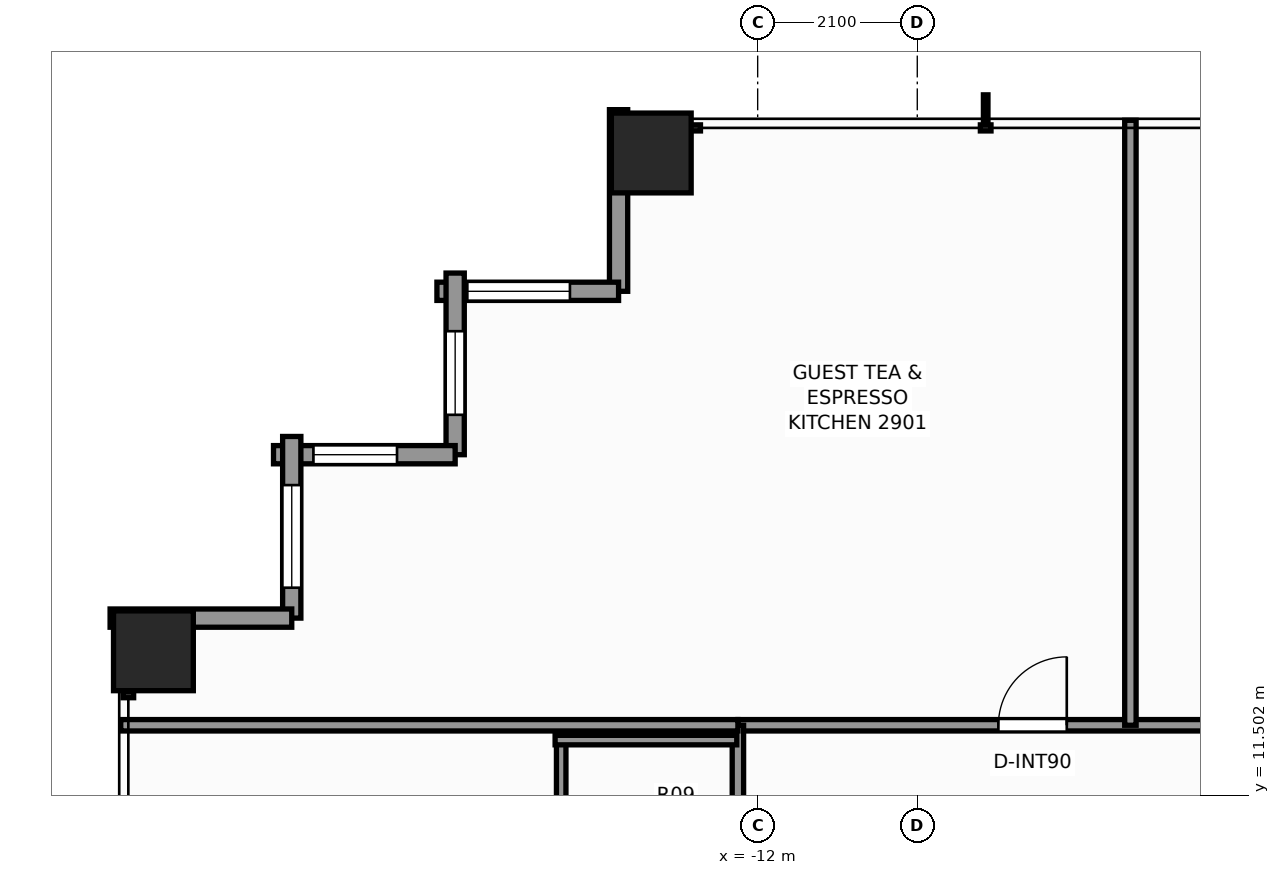
"""IFC4 building model, lengths in metres.
Left out: names, types, materials, properties, quantities, classifications, styles, units other than length and angle.
Written with IfcOpenShell. Run it as: python <this file> out.ifc"""

import sys

from ifc_helpers import new_model, si_unit, direction, frame, frame_2d, origin, origin_2d, place, context, subcontext, project, spatial, rectangle, extrude, element, fill, save


model = new_model("IFC4")
c1 = context("Model", 3, precision=1e-05, world=origin(), true_north=direction((0.0, 1.0)))
c2 = subcontext(c1, "Body", "Model", "MODEL_VIEW")
j1 = project(units=[si_unit("LENGTHUNIT", "METRE"), si_unit("PLANEANGLEUNIT", "RADIAN")], contexts=[c1])
p1 = place(None, origin())
s1 = spatial("IfcSite", under=j1, at=p1, CompositionType="ELEMENT")
p2 = place(p1, origin())
s2 = spatial("IfcBuilding", under=s1, at=p2, CompositionType="ELEMENT")
p3 = place(p2, frame((0.0, 0.0, 101.9)))
s3 = spatial("IfcBuildingStorey", under=s2, at=p3, CompositionType="ELEMENT", Elevation=101.9)
for number, where, z_axis, x_axis in (
    (1, (-13.4, 19.95, 0.0), (0.0, 0.0, 1.0), (1.0, 0.0, 0.0)),
    (2, (-19.95, 13.4, 0.0), (0.0, 0.0, 1.0), (1.0, 0.0, 0.0)),
):
    element("IfcColumn", number, at=place(p3, frame(where, z_axis=z_axis, x_axis=x_axis)), inside=s3, PredefinedType="COLUMN", context=c2, shape_type="SweptSolid", body=[
        extrude(rectangle(XDim=1.05, YDim=1.05, at=origin_2d()), origin(), (0.0, 0.0, 1.0), 3.3),
    ])
p4 = place(p3, frame((-13.83, 18.13, 0.0), z_axis=(0.0, 0.0, 1.0), x_axis=(0.0, 1.0, 0.0)))
e3 = element("IfcWall", 3, at=p4, inside=s3, PredefinedType="STANDARD", context=c2, shape_type="SweptSolid", body=[
    extrude(rectangle(XDim=2.39, YDim=0.24, at=frame_2d((1.195, 0.0))), origin(), (0.0, 0.0, 1.0), 2.459),
])
p5 = place(p3, frame((-16.22, 18.13, 0.0), z_axis=(0.0, 0.0, 1.0), x_axis=(1.0, 0.0, 0.0)))
e4 = element("IfcWall", 4, at=p5, inside=s3, PredefinedType="STANDARD", context=c2, shape_type="SweptSolid", body=[
    extrude(rectangle(XDim=2.39, YDim=0.24, at=frame_2d((1.195, 0.0))), origin(), (0.0, 0.0, 1.0), 2.459),
])
p6 = place(p5, frame((0.4, 0.0, 0.65)))
e5 = element("IfcOpeningElement", 5, at=p6, cuts=e4, PredefinedType="OPENING", context=c2, shape_type="SweptSolid", body=[
    extrude(rectangle(XDim=1.35, YDim=1.55, at=frame_2d((0.675, 0.775))), frame((0.0, 0.13, 0.0), z_axis=(0.0, -1.0, 0.0), x_axis=(1.0, 0.0, 0.0)), (0.0, 0.0, 1.0), 0.26),
])
p7 = place(p3, frame((-15.98, 15.98, 0.0), z_axis=(0.0, 0.0, 1.0), x_axis=(0.0, 1.0, 0.0)))
e6 = element("IfcWall", 6, at=p7, inside=s3, PredefinedType="STANDARD", context=c2, shape_type="SweptSolid", body=[
    extrude(rectangle(XDim=2.39, YDim=0.24, at=frame_2d((1.195, 0.0))), origin(), (0.0, 0.0, 1.0), 2.459),
])
p8 = place(p7, frame((0.525, 0.0, 0.65)))
e7 = element("IfcOpeningElement", 7, at=p8, cuts=e6, PredefinedType="OPENING", context=c2, shape_type="SweptSolid", body=[
    extrude(rectangle(XDim=1.1, YDim=1.45, at=frame_2d((0.55, 0.725))), frame((0.0, 0.13, 0.0), z_axis=(0.0, -1.0, 0.0), x_axis=(1.0, 0.0, 0.0)), (0.0, 0.0, 1.0), 0.26),
])
p9 = place(p3, frame((-18.37, 15.98, 0.0), z_axis=(0.0, 0.0, 1.0), x_axis=(1.0, 0.0, 0.0)))
e8 = element("IfcWall", 8, at=p9, inside=s3, PredefinedType="STANDARD", context=c2, shape_type="SweptSolid", body=[
    extrude(rectangle(XDim=2.39, YDim=0.24, at=frame_2d((1.195, 0.0))), origin(), (0.0, 0.0, 1.0), 2.459),
])
p10 = place(p9, frame((0.525, 0.0, 0.65)))
e9 = element("IfcOpeningElement", 9, at=p10, cuts=e8, PredefinedType="OPENING", context=c2, shape_type="SweptSolid", body=[
    extrude(rectangle(XDim=1.1, YDim=1.45, at=frame_2d((0.55, 0.725))), frame((0.0, 0.13, 0.0), z_axis=(0.0, -1.0, 0.0), x_axis=(1.0, 0.0, 0.0)), (0.0, 0.0, 1.0), 0.26),
])
p11 = place(p3, frame((-18.13, 13.83, 0.0), z_axis=(0.0, 0.0, 1.0), x_axis=(0.0, 1.0, 0.0)))
e10 = element("IfcWall", 10, at=p11, inside=s3, PredefinedType="STANDARD", context=c2, shape_type="SweptSolid", body=[
    extrude(rectangle(XDim=2.39, YDim=0.24, at=frame_2d((1.195, 0.0))), origin(), (0.0, 0.0, 1.0), 2.459),
])
p12 = place(p11, frame((0.4, 0.0, 0.65)))
e11 = element("IfcOpeningElement", 11, at=p12, cuts=e10, PredefinedType="OPENING", context=c2, shape_type="SweptSolid", body=[
    extrude(rectangle(XDim=1.35, YDim=1.55, at=frame_2d((0.675, 0.775))), frame((0.0, 0.13, 0.0), z_axis=(0.0, -1.0, 0.0), x_axis=(1.0, 0.0, 0.0)), (0.0, 0.0, 1.0), 0.26),
])
p13 = place(p3, frame((-20.52, 13.83, 0.0), z_axis=(0.0, 0.0, 1.0), x_axis=(1.0, 0.0, 0.0)))
e12 = element("IfcWall", 12, at=p13, inside=s3, PredefinedType="STANDARD", context=c2, shape_type="SweptSolid", body=[
    extrude(rectangle(XDim=2.39, YDim=0.24, at=frame_2d((1.195, 0.0))), origin(), (0.0, 0.0, 1.0), 2.459),
])
p14 = place(p3, frame((-12.26, 12.42, 0.0), z_axis=(0.0, 0.0, 1.0), x_axis=(1.0, 0.0, 0.0)))
e13 = element("IfcWall", 13, at=p14, inside=s3, PredefinedType="PARTITIONING", context=c2, shape_type="SweptSolid", body=[
    extrude(rectangle(XDim=24.52, YDim=0.15, at=frame_2d((12.26, 0.0))), origin(), (0.0, 0.0, 1.0), 2.292),
])
p15 = place(p14, frame((3.427, 0.0, 0.0)))
e14 = element("IfcOpeningElement", 14, at=p15, cuts=e13, PredefinedType="OPENING", context=c2, shape_type="SweptSolid", body=[
    extrude(rectangle(XDim=0.9, YDim=2.06, at=frame_2d((0.45, 1.03))), frame((0.0, 0.085, 0.0), z_axis=(0.0, -1.0, 0.0), x_axis=(1.0, 0.0, 0.0)), (0.0, 0.0, 1.0), 0.17),
])
p16 = place(p14, frame((9.78, 0.0, 0.0)))
e15 = element("IfcOpeningElement", 15, at=p16, cuts=e13, PredefinedType="OPENING", context=c2, shape_type="SweptSolid", body=[
    extrude(rectangle(XDim=0.9, YDim=2.06, at=frame_2d((0.45, 1.03))), frame((0.0, 0.085, 0.0), z_axis=(0.0, -1.0, 0.0), x_axis=(1.0, 0.0, 0.0)), (0.0, 0.0, 1.0), 0.17),
])
p17 = place(p14, frame((19.345, 0.0, 0.0)))
e16 = element("IfcOpeningElement", 16, at=p17, cuts=e13, PredefinedType="OPENING", context=c2, shape_type="SweptSolid", body=[
    extrude(rectangle(XDim=0.9, YDim=2.06, at=frame_2d((0.45, 1.03))), frame((0.0, 0.085, 0.0), z_axis=(0.0, -1.0, 0.0), x_axis=(1.0, 0.0, 0.0)), (0.0, 0.0, 1.0), 0.17),
])
p18 = place(p3, frame((-12.26, 7.4, 0.0), z_axis=(0.0, 0.0, 1.0), x_axis=(0.0, 1.0, 0.0)))
e17 = element("IfcWall", 17, at=p18, inside=s3, PredefinedType="PARTITIONING", context=c2, shape_type="SweptSolid", body=[
    extrude(rectangle(XDim=5.02, YDim=0.15, at=frame_2d((2.51, 0.0))), origin(), (0.0, 0.0, 1.0), 2.292),
])
p19 = place(p18, frame((0.564, 0.0, 0.0)))
e18 = element("IfcOpeningElement", 18, at=p19, cuts=e17, PredefinedType="OPENING", context=c2, shape_type="SweptSolid", body=[
    extrude(rectangle(XDim=0.95, YDim=2.06, at=frame_2d((0.475, 1.03))), frame((0.0, 0.085, 0.0), z_axis=(0.0, -1.0, 0.0), x_axis=(1.0, 0.0, 0.0)), (0.0, 0.0, 1.0), 0.17),
])
p20 = place(p3, frame((-20.38, 12.42, 0.0), z_axis=(0.0, 0.0, 1.0), x_axis=(1.0, 0.0, 0.0)))
e19 = element("IfcWall", 19, at=p20, inside=s3, PredefinedType="PARTITIONING", context=c2, shape_type="SweptSolid", body=[
    extrude(rectangle(XDim=8.12, YDim=0.15, at=frame_2d((4.06, 0.0))), origin(), (0.0, 0.0, 1.0), 2.292),
])
p21 = place(p3, frame((-7.096, 12.42, 0.0), z_axis=(0.0, 0.0, 1.0), x_axis=(0.0, 1.0, 0.0)))
e20 = element("IfcWall", 20, at=p21, inside=s3, PredefinedType="PARTITIONING", context=c2, shape_type="SweptSolid", body=[
    extrude(rectangle(XDim=7.96, YDim=0.15, at=frame_2d((3.98, 0.0))), origin(), (0.0, 0.0, 1.0), 2.449),
])
p22 = place(p3, frame((-14.585, 9.515, 0.0), z_axis=(0.0, 0.0, 1.0), x_axis=(0.0, 1.0, 0.0)))
e21 = element("IfcWall", 21, at=p22, inside=s3, PredefinedType="PARTITIONING", context=c2, shape_type="SweptSolid", body=[
    extrude(rectangle(XDim=2.77, YDim=0.125, at=frame_2d((1.385, 0.0))), origin(), (0.0, 0.0, 1.0), 2.292),
])
p23 = place(p3, frame((-14.665, 12.225, 0.0), z_axis=(0.0, 0.0, 1.0), x_axis=(1.0, 0.0, 0.0)))
e22 = element("IfcWall", 22, at=p23, inside=s3, PredefinedType="PARTITIONING", context=c2, shape_type="SweptSolid", body=[
    extrude(rectangle(XDim=2.39, YDim=0.125, at=frame_2d((1.195, 0.0))), origin(), (0.0, 0.0, 1.0), 3.08),
])
p24 = place(p6, origin())
e23 = element("IfcWindow", 23, at=p24, inside=s3, PartitioningType="SINGLE_PANEL", PredefinedType="WINDOW", context=c2, shape_type="SweptSolid", body=[
    extrude(rectangle(XDim=1.35, YDim=1.55, at=frame_2d((0.675, 0.775))), frame((0.0, 0.03, 0.0), z_axis=(0.0, -1.0, 0.0), x_axis=(1.0, 0.0, 0.0)), (0.0, 0.0, 1.0), 0.06),
])
fill(e5, e23)
p25 = place(p8, origin())
e24 = element("IfcWindow", 24, at=p25, inside=s3, PartitioningType="SINGLE_PANEL", PredefinedType="WINDOW", context=c2, shape_type="SweptSolid", body=[
    extrude(rectangle(XDim=1.1, YDim=1.45, at=frame_2d((0.55, 0.725))), frame((0.0, 0.03, 0.0), z_axis=(0.0, -1.0, 0.0), x_axis=(1.0, 0.0, 0.0)), (0.0, 0.0, 1.0), 0.06),
])
fill(e7, e24)
p26 = place(p10, origin())
e25 = element("IfcWindow", 25, at=p26, inside=s3, PartitioningType="SINGLE_PANEL", PredefinedType="WINDOW", context=c2, shape_type="SweptSolid", body=[
    extrude(rectangle(XDim=1.1, YDim=1.45, at=frame_2d((0.55, 0.725))), frame((0.0, 0.03, 0.0), z_axis=(0.0, -1.0, 0.0), x_axis=(1.0, 0.0, 0.0)), (0.0, 0.0, 1.0), 0.06),
])
fill(e9, e25)
p27 = place(p12, origin())
e26 = element("IfcWindow", 26, at=p27, inside=s3, PartitioningType="SINGLE_PANEL", PredefinedType="WINDOW", context=c2, shape_type="SweptSolid", body=[
    extrude(rectangle(XDim=1.35, YDim=1.55, at=frame_2d((0.675, 0.775))), frame((0.0, 0.03, 0.0), z_axis=(0.0, -1.0, 0.0), x_axis=(1.0, 0.0, 0.0)), (0.0, 0.0, 1.0), 0.06),
])
fill(e11, e26)
p28 = place(p15, origin())
e27 = element("IfcDoor", 27, at=p28, inside=s3, OperationType="SINGLE_SWING_RIGHT", PredefinedType="DOOR", context=c2, shape_type="SweptSolid", body=[
    extrude(rectangle(XDim=0.9, YDim=2.06, at=frame_2d((0.45, 1.03))), frame((0.0, 0.025, 0.0), z_axis=(0.0, -1.0, 0.0), x_axis=(1.0, 0.0, 0.0)), (0.0, 0.0, 1.0), 0.05),
])
fill(e14, e27)
save(model, sys.argv[1])
